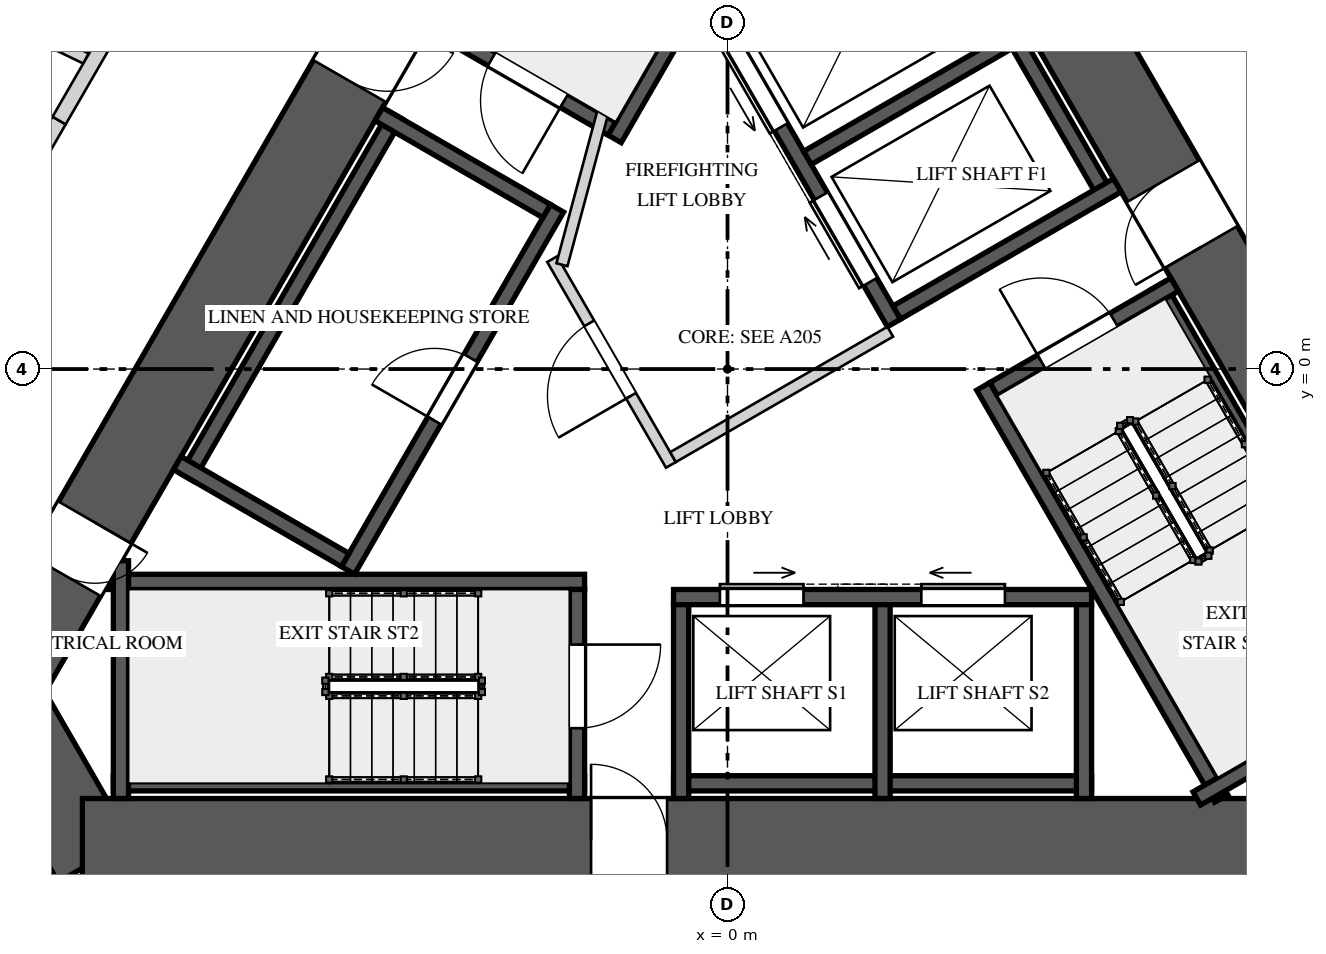
"""IFC4 building model, lengths in metres.
Left out: names, types, materials, properties, quantities, classifications, styles, units other than length and angle.
Written with IfcOpenShell. Run it as: python <this file> out.ifc"""

import sys

from ifc_helpers import new_model, si_unit, direction, frame, frame_2d, origin, place, context, subcontext, project, spatial, rectangle, extrude, element, fill, save


model = new_model("IFC4")
c1 = context("Model", 3, precision=1e-05, world=origin(), true_north=direction((0.0, 1.0)))
c2 = subcontext(c1, "Body", "Model", "MODEL_VIEW")
j1 = project(units=[si_unit("LENGTHUNIT", "METRE"), si_unit("PLANEANGLEUNIT", "RADIAN")], contexts=[c1])
p1 = place(None, origin())
s1 = spatial("IfcSite", under=j1, at=p1, CompositionType="ELEMENT")
p2 = place(p1, origin())
s2 = spatial("IfcBuilding", under=s1, at=p2, CompositionType="ELEMENT")
p3 = place(p2, frame((0.0, 0.0, 20.0)))
s3 = spatial("IfcBuildingStorey", under=s2, at=p3, CompositionType="ELEMENT", Elevation=20.0)
p4 = place(p3, frame((-1.126, 10.45, 0.0), z_axis=(0.0, 0.0, 1.0), x_axis=(-0.500001757713, -0.866024388966, 0.0)))
e1 = element("IfcWall", 1, at=p4, inside=s3, PredefinedType="SHEAR", context=c2, shape_type="SweptSolid", body=[
    extrude(rectangle(XDim=16.974, YDim=1.1, at=frame_2d((8.487, 0.0))), origin(), (0.0, 0.0, 1.0), 5.0),
])
p5 = place(p4, frame((6.692, 0.0, 0.0)))
e2 = element("IfcOpeningElement", 2, at=p5, cuts=e1, PredefinedType="OPENING", context=c2, shape_type="SweptSolid", body=[
    extrude(rectangle(XDim=1.0, YDim=2.4, at=frame_2d((0.5, 1.2))), frame((0.0, 0.56, 0.0), z_axis=(0.0, -1.0, 0.0), x_axis=(1.0, 0.0, 0.0)), (0.0, 0.0, 1.0), 1.12),
])
p6 = place(p4, frame((14.397, 0.0, 0.0)))
e3 = element("IfcOpeningElement", 3, at=p6, cuts=e1, PredefinedType="OPENING", context=c2, shape_type="SweptSolid", body=[
    extrude(rectangle(XDim=0.8, YDim=2.1, at=frame_2d((0.4, 1.05))), frame((0.0, 0.56, 0.0), z_axis=(0.0, -1.0, 0.0), x_axis=(1.0, 0.0, 0.0)), (0.0, 0.0, 1.0), 1.12),
])
p7 = place(p3, frame((-9.772, -3.975, 0.0), z_axis=(0.0, 0.0, 1.0), x_axis=(0.499995765644, -0.866027848477, 0.0)))
e4 = element("IfcWall", 4, at=p7, inside=s3, PredefinedType="SHEAR", context=c2, shape_type="SweptSolid", body=[
    extrude(rectangle(XDim=2.887, YDim=1.1, at=frame_2d((1.443, 0.0))), origin(), (0.0, 0.0, 1.0), 5.0),
])
p8 = place(p3, frame((-8.487, -6.2, 0.0), z_axis=(0.0, 0.0, 1.0), x_axis=(1.0, 0.0, 0.0)))
e5 = element("IfcWall", 5, at=p8, inside=s3, PredefinedType="SHEAR", context=c2, shape_type="SweptSolid", body=[
    extrude(rectangle(XDim=16.974, YDim=1.1, at=frame_2d((8.487, 0.0))), origin(), (0.0, 0.0, 1.0), 5.0),
])
p9 = place(p8, frame((6.692, 0.0, 0.0)))
e6 = element("IfcOpeningElement", 6, at=p9, cuts=e5, PredefinedType="OPENING", context=c2, shape_type="SweptSolid", body=[
    extrude(rectangle(XDim=1.0, YDim=2.4, at=frame_2d((0.5, 1.2))), frame((0.0, 0.56, 0.0), z_axis=(0.0, -1.0, 0.0), x_axis=(1.0, 0.0, 0.0)), (0.0, 0.0, 1.0), 1.12),
])
p10 = place(p3, frame((9.613, -4.25, 0.0), z_axis=(0.0, 0.0, 1.0), x_axis=(-0.500001757713, 0.866024388966, 0.0)))
e7 = element("IfcWall", 7, at=p10, inside=s3, PredefinedType="SHEAR", context=c2, shape_type="SweptSolid", body=[
    extrude(rectangle(XDim=16.974, YDim=1.1, at=frame_2d((8.487, 0.0))), origin(), (0.0, 0.0, 1.0), 5.0),
])
p11 = place(p10, frame((6.762, 0.0, 0.0)))
e8 = element("IfcOpeningElement", 8, at=p11, cuts=e7, PredefinedType="OPENING", context=c2, shape_type="SweptSolid", body=[
    extrude(rectangle(XDim=1.0, YDim=2.4, at=frame_2d((0.5, 1.2))), frame((0.0, 0.56, 0.0), z_axis=(0.0, -1.0, 0.0), x_axis=(1.0, 0.0, 0.0)), (0.0, 0.0, 1.0), 1.12),
])
p12 = place(p3, frame((1.646, 8.45, 0.0), z_axis=(0.0, 0.0, 1.0), x_axis=(-0.500006002103, -0.866021938441, 0.0)))
e9 = element("IfcWall", 9, at=p12, inside=s3, PredefinedType="SOLIDWALL", context=c2, shape_type="SweptSolid", body=[
    extrude(rectangle(XDim=6.261, YDim=0.2, at=frame_2d((3.13, 0.0))), origin(), (0.0, 0.0, 1.0), 4.65),
])
p13 = place(p3, frame((-1.521, 3.165, 0.0), z_axis=(0.0, 0.0, 1.0), x_axis=(-0.866027397988, 0.499996545922, 0.0)))
e10 = element("IfcWall", 10, at=p13, inside=s3, PredefinedType="SOLIDWALL", context=c2, shape_type="SweptSolid", body=[
    extrude(rectangle(XDim=2.75, YDim=0.2, at=frame_2d((1.375, 0.0))), origin(), (0.0, 0.0, 1.0), 4.65),
])
p14 = place(p13, frame((0.725, 0.0, 0.0)))
e11 = element("IfcOpeningElement", 11, at=p14, cuts=e10, PredefinedType="OPENING", context=c2, shape_type="SweptSolid", body=[
    extrude(rectangle(XDim=1.1, YDim=2.4, at=frame_2d((0.55, 1.2))), frame((0.0, 0.11, 0.0), z_axis=(0.0, -1.0, 0.0), x_axis=(1.0, 0.0, 0.0)), (0.0, 0.0, 1.0), 0.22),
])
p15 = place(p3, frame((-8.08, -5.45, 0.0), z_axis=(0.0, 0.0, 1.0), x_axis=(1.0, 0.0, 0.0)))
e12 = element("IfcWall", 12, at=p15, inside=s3, PredefinedType="SOLIDWALL", context=c2, shape_type="SweptSolid", body=[
    extrude(rectangle(XDim=6.2, YDim=0.2, at=frame_2d((3.1, 0.0))), origin(), (0.0, 0.0, 1.0), 4.65),
])
p16 = place(p3, frame((-8.141, -2.8, 0.0), z_axis=(0.0, 0.0, 1.0), x_axis=(1.0, 0.0, 0.0)))
e13 = element("IfcWall", 13, at=p16, inside=s3, PredefinedType="SOLIDWALL", context=c2, shape_type="SweptSolid", body=[
    extrude(rectangle(XDim=6.261, YDim=0.2, at=frame_2d((3.13, 0.0))), origin(), (0.0, 0.0, 1.0), 4.65),
])
p17 = place(p3, frame((-7.98, -2.522, 0.0), z_axis=(0.0, 0.0, 1.0), x_axis=(0.0, -1.0, 0.0)))
e14 = element("IfcWall", 14, at=p17, inside=s3, PredefinedType="SOLIDWALL", context=c2, shape_type="SweptSolid", body=[
    extrude(rectangle(XDim=3.128, YDim=0.2, at=frame_2d((1.564, 0.0))), origin(), (0.0, 0.0, 1.0), 4.65),
])
p18 = place(p3, frame((-1.98, -2.9, 0.0), z_axis=(0.0, 0.0, 1.0), x_axis=(0.0, -1.0, 0.0)))
e15 = element("IfcWall", 15, at=p18, inside=s3, PredefinedType="SOLIDWALL", context=c2, shape_type="SweptSolid", body=[
    extrude(rectangle(XDim=2.75, YDim=0.2, at=frame_2d((1.375, 0.0))), origin(), (0.0, 0.0, 1.0), 4.65),
])
p19 = place(p18, frame((0.725, 0.0, 0.0)))
e16 = element("IfcOpeningElement", 16, at=p19, cuts=e15, PredefinedType="OPENING", context=c2, shape_type="SweptSolid", body=[
    extrude(rectangle(XDim=1.1, YDim=2.4, at=frame_2d((0.55, 1.2))), frame((0.0, 0.11, 0.0), z_axis=(0.0, -1.0, 0.0), x_axis=(1.0, 0.0, 0.0)), (0.0, 0.0, 1.0), 0.22),
])
p20 = place(p3, frame((8.76, -4.272, 0.0), z_axis=(0.0, 0.0, 1.0), x_axis=(-0.49998037582, 0.866036733513, 0.0)))
e17 = element("IfcWall", 17, at=p20, inside=s3, PredefinedType="SOLIDWALL", context=c2, shape_type="SweptSolid", body=[
    extrude(rectangle(XDim=6.2, YDim=0.2, at=frame_2d((3.1, 0.0))), origin(), (0.0, 0.0, 1.0), 4.65),
])
p21 = place(p3, frame((6.495, -5.65, 0.0), z_axis=(0.0, 0.0, 1.0), x_axis=(-0.499976754523, 0.866038824151, 0.0)))
e18 = element("IfcWall", 18, at=p21, inside=s3, PredefinedType="SOLIDWALL", context=c2, shape_type="SweptSolid", body=[
    extrude(rectangle(XDim=6.26, YDim=0.2, at=frame_2d((3.13, 0.0))), origin(), (0.0, 0.0, 1.0), 4.65),
])
p22 = place(p3, frame((6.174, -5.65, 0.0), z_axis=(0.0, 0.0, 1.0), x_axis=(0.866054327916, 0.499949898588, 0.0)))
e19 = element("IfcWall", 19, at=p22, inside=s3, PredefinedType="SOLIDWALL", context=c2, shape_type="SweptSolid", body=[
    extrude(rectangle(XDim=3.128, YDim=0.2, at=frame_2d((1.564, 0.0))), origin(), (0.0, 0.0, 1.0), 4.65),
])
p23 = place(p3, frame((3.501, -0.265, 0.0), z_axis=(0.0, 0.0, 1.0), x_axis=(0.866027397988, 0.499996545922, 0.0)))
e20 = element("IfcWall", 20, at=p23, inside=s3, PredefinedType="SOLIDWALL", context=c2, shape_type="SweptSolid", body=[
    extrude(rectangle(XDim=2.75, YDim=0.2, at=frame_2d((1.375, 0.0))), origin(), (0.0, 0.0, 1.0), 4.65),
])
p24 = place(p23, frame((0.725, 0.0, 0.0)))
e21 = element("IfcOpeningElement", 21, at=p24, cuts=e20, PredefinedType="OPENING", context=c2, shape_type="SweptSolid", body=[
    extrude(rectangle(XDim=1.1, YDim=2.4, at=frame_2d((0.55, 1.2))), frame((0.0, 0.11, 0.0), z_axis=(0.0, -1.0, 0.0), x_axis=(1.0, 0.0, 0.0)), (0.0, 0.0, 1.0), 0.22),
])
p25 = place(p3, frame((-4.993, -2.648, 0.0), z_axis=(0.0, 0.0, 1.0), x_axis=(0.499996545922, 0.866027397988, 0.0)))
e22 = element("IfcWall", 22, at=p25, inside=s3, PredefinedType="SOLIDWALL", context=c2, shape_type="SweptSolid", body=[
    extrude(rectangle(XDim=5.5, YDim=0.2, at=frame_2d((2.75, 0.0))), origin(), (0.0, 0.0, 1.0), 4.65),
])
p26 = place(p25, frame((2.275, 0.0, 0.0)))
e23 = element("IfcOpeningElement", 23, at=p26, cuts=e22, PredefinedType="OPENING", context=c2, shape_type="SweptSolid", body=[
    extrude(rectangle(XDim=0.95, YDim=2.4, at=frame_2d((0.475, 1.2))), frame((0.0, 0.11, 0.0), z_axis=(0.0, -1.0, 0.0), x_axis=(1.0, 0.0, 0.0)), (0.0, 0.0, 1.0), 0.22),
])
p27 = place(p3, frame((-4.365, 3.34, 0.0), z_axis=(0.0, 0.0, 1.0), x_axis=(-0.499996545922, -0.866027397988, 0.0)))
e24 = element("IfcWall", 24, at=p27, inside=s3, PredefinedType="SOLIDWALL", context=c2, shape_type="SweptSolid", body=[
    extrude(rectangle(XDim=5.5, YDim=0.2, at=frame_2d((2.75, 0.0))), origin(), (0.0, 0.0, 1.0), 4.65),
])
for number, where, z_axis, x_axis in (
    (25, (-2.38, 2.078, 0.0), (0.0, 0.0, 1.0), (-0.866, 0.5, 0.0)),
    (26, (-5.03, -2.512, 0.0), (0.0, 0.0, 1.0), (-0.866, 0.5, 0.0)),
):
    element("IfcWall", number, at=place(p3, frame(where, z_axis=z_axis, x_axis=x_axis)), inside=s3, PredefinedType="SOLIDWALL", context=c2, shape_type="SweptSolid", body=[
        extrude(rectangle(XDim=2.55, YDim=0.2, at=frame_2d((1.275, 0.0))), origin(), (0.0, 0.0, 1.0), 4.65),
    ])
p28 = place(p3, frame((-0.71, -3.0, 0.0), z_axis=(0.0, 0.0, 1.0), x_axis=(1.0, 0.0, 0.0)))
e27 = element("IfcWall", 27, at=p28, inside=s3, PredefinedType="SOLIDWALL", context=c2, shape_type="SweptSolid", body=[
    extrude(rectangle(XDim=5.5, YDim=0.2, at=frame_2d((2.75, 0.0))), origin(), (0.0, 0.0, 1.0), 4.65),
])
p29 = place(p28, frame((0.61, 0.0, 0.0)))
e28 = element("IfcOpeningElement", 28, at=p29, cuts=e27, PredefinedType="OPENING", context=c2, shape_type="SweptSolid", body=[
    extrude(rectangle(XDim=1.1, YDim=2.1, at=frame_2d((0.55, 1.05))), frame((0.0, 0.11, 0.0), z_axis=(0.0, -1.0, 0.0), x_axis=(1.0, 0.0, 0.0)), (0.0, 0.0, 1.0), 0.22),
])
p30 = place(p28, frame((3.26, 0.0, 0.0)))
e29 = element("IfcOpeningElement", 29, at=p30, cuts=e27, PredefinedType="OPENING", context=c2, shape_type="SweptSolid", body=[
    extrude(rectangle(XDim=1.1, YDim=2.1, at=frame_2d((0.55, 1.05))), frame((0.0, 0.11, 0.0), z_axis=(0.0, -1.0, 0.0), x_axis=(1.0, 0.0, 0.0)), (0.0, 0.0, 1.0), 0.22),
])
p31 = place(p3, frame((-0.71, -5.45, 0.0), z_axis=(0.0, 0.0, 1.0), x_axis=(1.0, 0.0, 0.0)))
e30 = element("IfcWall", 30, at=p31, inside=s3, PredefinedType="SOLIDWALL", context=c2, shape_type="SweptSolid", body=[
    extrude(rectangle(XDim=5.5, YDim=0.2, at=frame_2d((2.75, 0.0))), origin(), (0.0, 0.0, 1.0), 4.65),
])
for number, where, z_axis, x_axis in (
    (31, (-0.61, -3.1, 0.0), (0.0, 0.0, 1.0), (0.0, -1.0, 0.0)),
    (32, (2.04, -3.1, 0.0), (0.0, 0.0, 1.0), (0.0, -1.0, 0.0)),
    (33, (4.69, -3.1, 0.0), (0.0, 0.0, 1.0), (0.0, -1.0, 0.0)),
):
    element("IfcWall", number, at=place(p3, frame(where, z_axis=z_axis, x_axis=x_axis)), inside=s3, PredefinedType="SOLIDWALL", context=c2, shape_type="SweptSolid", body=[
        extrude(rectangle(XDim=2.55, YDim=0.2, at=frame_2d((1.275, 0.0))), origin(), (0.0, 0.0, 1.0), 4.65),
    ])
p32 = place(p3, frame((2.19, 0.606, 0.0), z_axis=(0.0, 0.0, 1.0), x_axis=(-0.500002801628, 0.866023786258, 0.0)))
e34 = element("IfcWall", 34, at=p32, inside=s3, PredefinedType="SOLIDWALL", context=c2, shape_type="SweptSolid", body=[
    extrude(rectangle(XDim=4.9, YDim=0.2, at=frame_2d((2.45, 0.0))), origin(), (0.0, 0.0, 1.0), 4.65),
])
p33 = place(p32, frame((0.625, 0.0, 0.0)))
e35 = element("IfcOpeningElement", 35, at=p33, cuts=e34, PredefinedType="OPENING", context=c2, shape_type="SweptSolid", body=[
    extrude(rectangle(XDim=1.3, YDim=2.1, at=frame_2d((0.65, 1.05))), frame((0.0, 0.11, 0.0), z_axis=(0.0, -1.0, 0.0), x_axis=(1.0, 0.0, 0.0)), (0.0, 0.0, 1.0), 0.22),
])
p34 = place(p32, frame((2.975, 0.0, 0.0)))
e36 = element("IfcOpeningElement", 36, at=p34, cuts=e34, PredefinedType="OPENING", context=c2, shape_type="SweptSolid", body=[
    extrude(rectangle(XDim=1.3, YDim=2.1, at=frame_2d((0.65, 1.05))), frame((0.0, 0.11, 0.0), z_axis=(0.0, -1.0, 0.0), x_axis=(1.0, 0.0, 0.0)), (0.0, 0.0, 1.0), 0.22),
])
p35 = place(p3, frame((5.005, 2.231, 0.0), z_axis=(0.0, 0.0, 1.0), x_axis=(-0.500002801628, 0.866023786258, 0.0)))
e37 = element("IfcWall", 37, at=p35, inside=s3, PredefinedType="SOLIDWALL", context=c2, shape_type="SweptSolid", body=[
    extrude(rectangle(XDim=4.9, YDim=0.2, at=frame_2d((2.45, 0.0))), origin(), (0.0, 0.0, 1.0), 4.65),
])
p36 = place(p3, frame((2.227, 0.743, 0.0), z_axis=(0.0, 0.0, 1.0), x_axis=(0.866014461049, 0.500018952895, 0.0)))
e38 = element("IfcWall", 38, at=p36, inside=s3, PredefinedType="SOLIDWALL", context=c2, shape_type="SweptSolid", body=[
    extrude(rectangle(XDim=3.35, YDim=0.2, at=frame_2d((1.675, 0.0))), origin(), (0.0, 0.0, 1.0), 4.65),
])
p37 = place(p3, frame((1.052, 2.778, 0.0), z_axis=(0.0, 0.0, 1.0), x_axis=(0.866032680314, 0.499987396469, 0.0)))
e39 = element("IfcWall", 39, at=p37, inside=s3, PredefinedType="SOLIDWALL", context=c2, shape_type="SweptSolid", body=[
    extrude(rectangle(XDim=3.35, YDim=0.2, at=frame_2d((1.675, 0.0))), origin(), (0.0, 0.0, 1.0), 4.65),
])
p38 = place(p3, frame((-0.744, -1.261, 0.0), z_axis=(0.0, 0.0, 1.0), x_axis=(-0.500004234368, 0.866022959057, 0.0)))
e40 = element("IfcWall", 40, at=p38, inside=s3, PredefinedType="PARTITIONING", context=c2, shape_type="SweptSolid", body=[
    extrude(rectangle(XDim=3.125, YDim=0.15, at=frame_2d((1.562, 0.0))), origin(), (0.0, 0.0, 1.0), 4.65),
])
p39 = place(p38, frame((1.05, 0.0, 0.0)))
e41 = element("IfcOpeningElement", 41, at=p39, cuts=e40, PredefinedType="OPENING", context=c2, shape_type="SweptSolid", body=[
    extrude(rectangle(XDim=1.1, YDim=2.4, at=frame_2d((0.55, 1.2))), frame((0.0, 0.085, 0.0), z_axis=(0.0, -1.0, 0.0), x_axis=(1.0, 0.0, 0.0)), (0.0, 0.0, 1.0), 0.17),
])
p40 = place(p3, frame((-0.717, -1.159, 0.0), z_axis=(0.0, 0.0, 1.0), x_axis=(0.866008176907, 0.50002983664, 0.0)))
e42 = element("IfcWall", 42, at=p40, inside=s3, PredefinedType="PARTITIONING", context=c2, shape_type="SweptSolid", body=[
    extrude(rectangle(XDim=3.3, YDim=0.15, at=frame_2d((1.65, 0.0))), origin(), (0.0, 0.0, 1.0), 4.65),
])
p41 = place(p3, frame((-2.178, 1.372, 0.0), z_axis=(0.0, 0.0, 1.0), x_axis=(0.258808958833, 0.96592852884, 0.0)))
e43 = element("IfcWall", 43, at=p41, inside=s3, PredefinedType="PARTITIONING", context=c2, shape_type="SweptSolid", body=[
    extrude(rectangle(XDim=2.903, YDim=0.15, at=frame_2d((1.451, 0.0))), origin(), (0.0, 0.0, 1.0), 4.65),
])
p42 = place(p3, frame((-1.51, 4.215, 0.0), z_axis=(0.0, 0.0, 1.0), x_axis=(0.866085525409, 0.49989585183, 0.0)))
e44 = element("IfcWall", 44, at=p42, inside=s3, PredefinedType="PARTITIONING", context=c2, shape_type="SweptSolid", body=[
    extrude(rectangle(XDim=1.3, YDim=0.15, at=frame_2d((0.65, 0.0))), origin(), (0.0, 0.0, 1.0), 4.65),
])
p43 = place(p3, frame((-8.438, 4.085, 0.0), z_axis=(0.0, 0.0, 1.0), x_axis=(-0.900092423944, 0.435699011197, 0.0)))
e45 = element("IfcWall", 45, at=p43, inside=s3, PredefinedType="PARTITIONING", context=c2, shape_type="SweptSolid", body=[
    extrude(rectangle(XDim=9.104, YDim=0.15, at=frame_2d((4.552, 0.0))), origin(), (0.0, 0.0, 1.0), 4.65),
])
p44 = place(p3, frame((-9.202, 2.561, 0.0), z_axis=(0.0, 0.0, 1.0), x_axis=(0.500118501653, 0.865956976012, 0.0)))
e46 = element("IfcWall", 46, at=p44, inside=s3, PredefinedType="SOLIDWALL", context=c2, shape_type="SweptSolid", body=[
    extrude(rectangle(XDim=0.818, YDim=0.2, at=frame_2d((0.409, 0.0))), origin(), (0.0, 0.0, 1.0), 3.75),
])
p45 = place(p3, frame((-8.793, 3.27, 0.0), z_axis=(0.0, 0.0, 1.0), x_axis=(0.499947505232, 0.866055709532, 0.0)))
e47 = element("IfcWall", 47, at=p45, inside=s3, PredefinedType="SOLIDWALL", context=c2, shape_type="SweptSolid", body=[
    extrude(rectangle(XDim=3.13, YDim=0.2, at=frame_2d((1.565, 0.0))), origin(), (0.0, 0.0, 1.0), 4.65),
])
p46 = place(p14, origin())
e48 = element("IfcDoor", 48, at=p46, inside=s3, OperationType="SINGLE_SWING_RIGHT", PredefinedType="DOOR", context=c2, shape_type="SweptSolid", body=[
    extrude(rectangle(XDim=1.1, YDim=2.4, at=frame_2d((0.55, 1.2))), frame((0.0, 0.025, 0.0), z_axis=(0.0, -1.0, 0.0), x_axis=(1.0, 0.0, 0.0)), (0.0, 0.0, 1.0), 0.05),
])
fill(e11, e48)
p47 = place(p19, origin())
e49 = element("IfcDoor", 49, at=p47, inside=s3, OperationType="SINGLE_SWING_LEFT", PredefinedType="DOOR", context=c2, shape_type="SweptSolid", body=[
    extrude(rectangle(XDim=1.1, YDim=2.4, at=frame_2d((0.55, 1.2))), frame((0.0, 0.025, 0.0), z_axis=(0.0, -1.0, 0.0), x_axis=(1.0, 0.0, 0.0)), (0.0, 0.0, 1.0), 0.05),
])
fill(e16, e49)
p48 = place(p24, origin())
e50 = element("IfcDoor", 50, at=p48, inside=s3, OperationType="SINGLE_SWING_RIGHT", PredefinedType="DOOR", context=c2, shape_type="SweptSolid", body=[
    extrude(rectangle(XDim=1.1, YDim=2.4, at=frame_2d((0.55, 1.2))), frame((0.0, 0.025, 0.0), z_axis=(0.0, -1.0, 0.0), x_axis=(1.0, 0.0, 0.0)), (0.0, 0.0, 1.0), 0.05),
])
fill(e21, e50)
p49 = place(p26, origin())
e51 = element("IfcDoor", 51, at=p49, inside=s3, OperationType="SINGLE_SWING_LEFT", PredefinedType="DOOR", context=c2, shape_type="SweptSolid", body=[
    extrude(rectangle(XDim=0.95, YDim=2.4, at=frame_2d((0.475, 1.2))), frame((0.0, 0.025, 0.0), z_axis=(0.0, -1.0, 0.0), x_axis=(1.0, 0.0, 0.0)), (0.0, 0.0, 1.0), 0.05),
])
fill(e23, e51)
p50 = place(p29, origin())
e52 = element("IfcDoor", 52, at=p50, inside=s3, OperationType="SLIDING_TO_RIGHT", PredefinedType="DOOR", context=c2, shape_type="SweptSolid", body=[
    extrude(rectangle(XDim=1.1, YDim=2.1, at=frame_2d((0.55, 1.05))), frame((0.0, 0.025, 0.0), z_axis=(0.0, -1.0, 0.0), x_axis=(1.0, 0.0, 0.0)), (0.0, 0.0, 1.0), 0.05),
])
fill(e28, e52)
p51 = place(p30, origin())
e53 = element("IfcDoor", 53, at=p51, inside=s3, OperationType="SLIDING_TO_LEFT", PredefinedType="DOOR", context=c2, shape_type="SweptSolid", body=[
    extrude(rectangle(XDim=1.1, YDim=2.1, at=frame_2d((0.55, 1.05))), frame((0.0, 0.025, 0.0), z_axis=(0.0, -1.0, 0.0), x_axis=(1.0, 0.0, 0.0)), (0.0, 0.0, 1.0), 0.05),
])
fill(e29, e53)
p52 = place(p33, origin())
e54 = element("IfcDoor", 54, at=p52, inside=s3, OperationType="SLIDING_TO_RIGHT", PredefinedType="DOOR", context=c2, shape_type="SweptSolid", body=[
    extrude(rectangle(XDim=1.3, YDim=2.1, at=frame_2d((0.65, 1.05))), frame((0.0, 0.025, 0.0), z_axis=(0.0, -1.0, 0.0), x_axis=(1.0, 0.0, 0.0)), (0.0, 0.0, 1.0), 0.05),
])
fill(e35, e54)
p53 = place(p34, origin())
e55 = element("IfcDoor", 55, at=p53, inside=s3, OperationType="SLIDING_TO_LEFT", PredefinedType="DOOR", context=c2, shape_type="SweptSolid", body=[
    extrude(rectangle(XDim=1.3, YDim=2.1, at=frame_2d((0.65, 1.05))), frame((0.0, 0.025, 0.0), z_axis=(0.0, -1.0, 0.0), x_axis=(1.0, 0.0, 0.0)), (0.0, 0.0, 1.0), 0.05),
])
fill(e36, e55)
p54 = place(p39, origin())
e56 = element("IfcDoor", 56, at=p54, inside=s3, OperationType="SINGLE_SWING_RIGHT", PredefinedType="DOOR", context=c2, shape_type="SweptSolid", body=[
    extrude(rectangle(XDim=1.1, YDim=2.4, at=frame_2d((0.55, 1.2))), frame((0.0, 0.025, 0.0), z_axis=(0.0, -1.0, 0.0), x_axis=(1.0, 0.0, 0.0)), (0.0, 0.0, 1.0), 0.05),
])
fill(e41, e56)
p55 = place(p5, origin())
e57 = element("IfcDoor", 57, at=p55, inside=s3, OperationType="SINGLE_SWING_LEFT", PredefinedType="DOOR", context=c2, shape_type="SweptSolid", body=[
    extrude(rectangle(XDim=1.0, YDim=2.4, at=frame_2d((0.5, 1.2))), frame((0.0, 0.025, 0.0), z_axis=(0.0, -1.0, 0.0), x_axis=(1.0, 0.0, 0.0)), (0.0, 0.0, 1.0), 0.05),
])
fill(e2, e57)
p56 = place(p9, origin())
e58 = element("IfcDoor", 58, at=p56, inside=s3, OperationType="SINGLE_SWING_RIGHT", PredefinedType="DOOR", context=c2, shape_type="SweptSolid", body=[
    extrude(rectangle(XDim=1.0, YDim=2.4, at=frame_2d((0.5, 1.2))), frame((0.0, 0.025, 0.0), z_axis=(0.0, -1.0, 0.0), x_axis=(1.0, 0.0, 0.0)), (0.0, 0.0, 1.0), 0.05),
])
fill(e6, e58)
p57 = place(p11, origin())
e59 = element("IfcDoor", 59, at=p57, inside=s3, OperationType="SINGLE_SWING_LEFT", PredefinedType="DOOR", context=c2, shape_type="SweptSolid", body=[
    extrude(rectangle(XDim=1.0, YDim=2.4, at=frame_2d((0.5, 1.2))), frame((0.0, 0.025, 0.0), z_axis=(0.0, -1.0, 0.0), x_axis=(1.0, 0.0, 0.0)), (0.0, 0.0, 1.0), 0.05),
])
fill(e8, e59)
p58 = place(p6, origin())
e60 = element("IfcDoor", 60, at=p58, inside=s3, OperationType="SINGLE_SWING_RIGHT", PredefinedType="DOOR", context=c2, shape_type="SweptSolid", body=[
    extrude(rectangle(XDim=0.8, YDim=2.1, at=frame_2d((0.4, 1.05))), frame((0.0, 0.025, 0.0), z_axis=(0.0, -1.0, 0.0), x_axis=(1.0, 0.0, 0.0)), (0.0, 0.0, 1.0), 0.05),
])
fill(e3, e60)
save(model, sys.argv[1])
